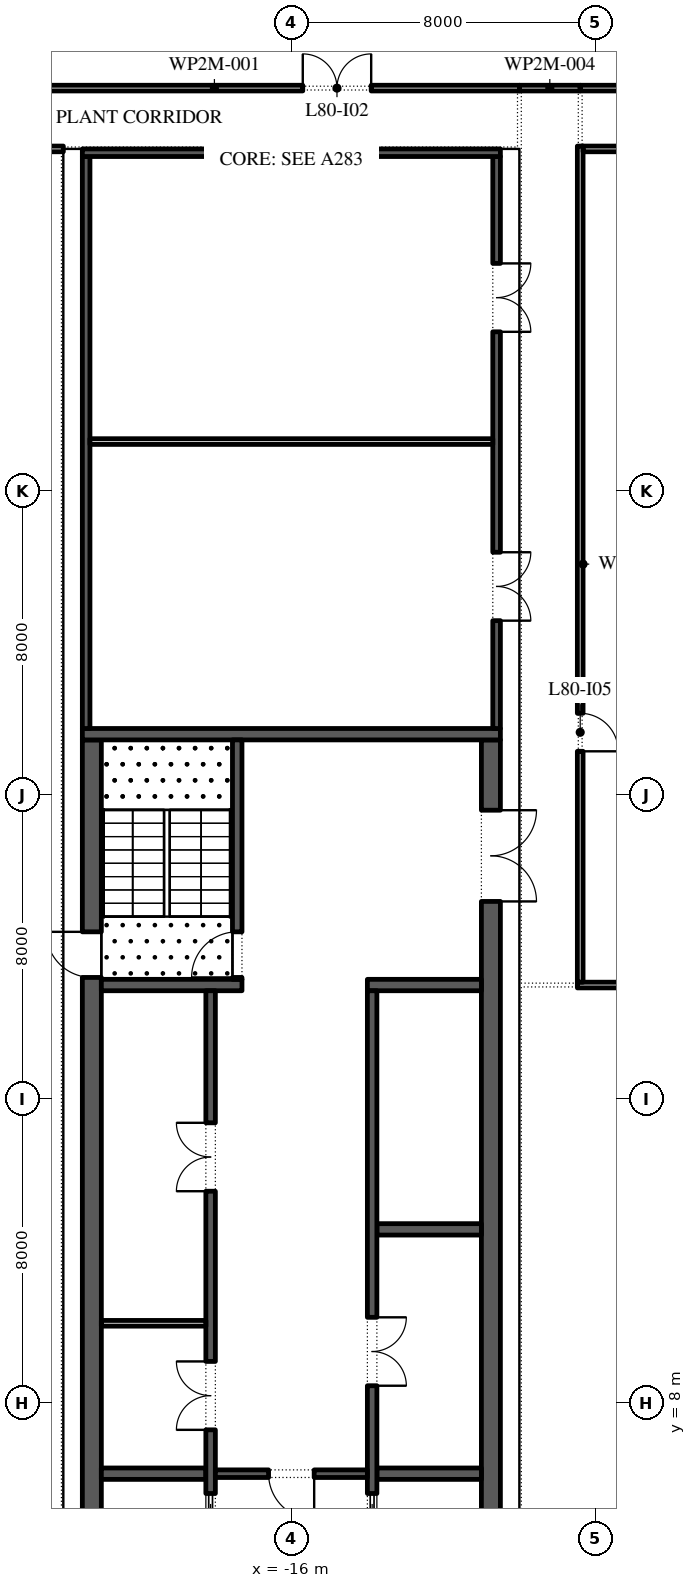
"""IFC4 building model, lengths in metres.
Left out: names, types, materials, properties, quantities, classifications, styles, units other than length and angle.
Written with IfcOpenShell. Run it as: python <this file> out.ifc"""

import sys

from ifc_helpers import new_model, si_unit, direction, frame, frame_2d, origin, place, context, subcontext, project, spatial, rectangle, extrude, element, fill, save


model = new_model("IFC4")
c1 = context("Model", 3, precision=1e-05, world=origin(), true_north=direction((0.0, 1.0)))
c2 = subcontext(c1, "Body", "Model", "MODEL_VIEW")
j1 = project(units=[si_unit("LENGTHUNIT", "METRE"), si_unit("PLANEANGLEUNIT", "RADIAN")], contexts=[c1])
p1 = place(None, origin())
s1 = spatial("IfcSite", under=j1, at=p1, CompositionType="ELEMENT")
p2 = place(p1, origin())
s2 = spatial("IfcBuilding", under=s1, at=p2, CompositionType="ELEMENT")
p3 = place(p2, frame((0.0, 0.0, 363.6)))
s3 = spatial("IfcBuildingStorey", under=s2, at=p3, CompositionType="ELEMENT", Elevation=363.6)
p4 = place(p3, frame((-21.25, -2.45, 0.0), z_axis=(0.0, 0.0, 1.0), x_axis=(0.0, 1.0, 0.0)))
e1 = element("IfcWall", 1, at=p4, inside=s3, PredefinedType="SHEAR", context=c2, shape_type="SweptSolid", body=[
    extrude(rectangle(XDim=27.9, YDim=0.5, at=frame_2d((13.95, 0.0))), origin(), (0.0, 0.0, 1.0), 5.2),
])
p5 = place(p4, frame((5.05, 0.0, 0.0)))
e2 = element("IfcOpeningElement", 2, at=p5, cuts=e1, PredefinedType="OPENING", context=c2, shape_type="SweptSolid", body=[
    extrude(rectangle(XDim=1.2, YDim=2.1, at=frame_2d((0.6, 1.05))), frame((0.0, 0.26, 0.0), z_axis=(0.0, -1.0, 0.0), x_axis=(1.0, 0.0, 0.0)), (0.0, 0.0, 1.0), 0.52),
])
p6 = place(p4, frame((21.65, 0.0, 0.0)))
e3 = element("IfcOpeningElement", 3, at=p6, cuts=e1, PredefinedType="OPENING", context=c2, shape_type="SweptSolid", body=[
    extrude(rectangle(XDim=1.2, YDim=2.1, at=frame_2d((0.6, 1.05))), frame((0.0, 0.26, 0.0), z_axis=(0.0, -1.0, 0.0), x_axis=(1.0, 0.0, 0.0)), (0.0, 0.0, 1.0), 0.52),
])
p7 = place(p3, frame((-10.75, -2.45, 0.0), z_axis=(0.0, 0.0, 1.0), x_axis=(0.0, 1.0, 0.0)))
e4 = element("IfcWall", 4, at=p7, inside=s3, PredefinedType="SHEAR", context=c2, shape_type="SweptSolid", body=[
    extrude(rectangle(XDim=27.9, YDim=0.5, at=frame_2d((13.95, 0.0))), origin(), (0.0, 0.0, 1.0), 5.2),
])
p8 = place(p7, frame((23.65, 0.0, 0.0)))
e5 = element("IfcOpeningElement", 5, at=p8, cuts=e4, PredefinedType="OPENING", context=c2, shape_type="SweptSolid", body=[
    extrude(rectangle(XDim=2.4, YDim=2.1, at=frame_2d((1.2, 1.05))), frame((0.0, 0.26, 0.0), z_axis=(0.0, -1.0, 0.0), x_axis=(1.0, 0.0, 0.0)), (0.0, 0.0, 1.0), 0.52),
])
p9 = place(p7, frame((0.637, 0.0, 0.0)))
e6 = element("IfcOpeningElement", 6, at=p9, cuts=e4, PredefinedType="OPENING", context=c2, shape_type="SweptSolid", body=[
    extrude(rectangle(XDim=1.8, YDim=2.4, at=frame_2d((0.9, 1.2))), frame((0.0, 0.26, 0.0), z_axis=(0.0, -1.0, 0.0), x_axis=(1.0, 0.0, 0.0)), (0.0, 0.0, 1.0), 0.52),
])
p10 = place(p7, frame((3.863, 0.0, 0.0)))
e7 = element("IfcOpeningElement", 7, at=p10, cuts=e4, PredefinedType="OPENING", context=c2, shape_type="SweptSolid", body=[
    extrude(rectangle(XDim=1.8, YDim=2.4, at=frame_2d((0.9, 1.2))), frame((0.0, 0.26, 0.0), z_axis=(0.0, -1.0, 0.0), x_axis=(1.0, 0.0, 0.0)), (0.0, 0.0, 1.0), 0.52),
])
p11 = place(p3, frame((-21.5, 25.6, 0.0), z_axis=(0.0, 0.0, 1.0), x_axis=(1.0, 0.0, 0.0)))
e8 = element("IfcWall", 8, at=p11, inside=s3, PredefinedType="SHEAR", context=c2, shape_type="SweptSolid", body=[
    extrude(rectangle(XDim=11.0, YDim=0.3, at=frame_2d((5.5, 0.0))), origin(), (0.0, 0.0, 1.0), 5.2),
])
p12 = place(p3, frame((-21.0, 19.0, 0.0), z_axis=(0.0, 0.0, 1.0), x_axis=(1.0, 0.0, 0.0)))
e9 = element("IfcWall", 9, at=p12, inside=s3, PredefinedType="SHEAR", context=c2, shape_type="SweptSolid", body=[
    extrude(rectangle(XDim=3.7, YDim=0.3, at=frame_2d((1.85, 0.0))), origin(), (0.0, 0.0, 1.0), 5.2),
])
p13 = place(p3, frame((-17.425, 19.15, 0.0), z_axis=(0.0, 0.0, 1.0), x_axis=(0.0, 1.0, 0.0)))
e10 = element("IfcWall", 10, at=p13, inside=s3, PredefinedType="SHEAR", context=c2, shape_type="SweptSolid", body=[
    extrude(rectangle(XDim=6.3, YDim=0.25, at=frame_2d((3.15, 0.0))), origin(), (0.0, 0.0, 1.0), 5.2),
])
p14 = place(p13, frame((0.05, 0.0, 0.0)))
e11 = element("IfcOpeningElement", 11, at=p14, cuts=e10, PredefinedType="OPENING", context=c2, shape_type="SweptSolid", body=[
    extrude(rectangle(XDim=1.2, YDim=2.1, at=frame_2d((0.6, 1.05))), frame((0.0, 0.135, 0.0), z_axis=(0.0, -1.0, 0.0), x_axis=(1.0, 0.0, 0.0)), (0.0, 0.0, 1.0), 0.27),
])
p15 = place(p3, frame((-21.0, 6.143, 0.0), z_axis=(0.0, 0.0, 1.0), x_axis=(1.0, 0.0, 0.0)))
e12 = element("IfcWall", 12, at=p15, inside=s3, PredefinedType="SHEAR", context=c2, shape_type="SweptSolid", body=[
    extrude(rectangle(XDim=2.75, YDim=0.3, at=frame_2d((1.375, 0.0))), origin(), (0.0, 0.0, 1.0), 5.2),
])
p16 = place(p3, frame((-18.125, 4.15, 0.0), z_axis=(0.0, 0.0, 1.0), x_axis=(0.0, 1.0, 0.0)))
e13 = element("IfcWall", 13, at=p16, inside=s3, PredefinedType="SHEAR", context=c2, shape_type="SweptSolid", body=[
    extrude(rectangle(XDim=14.7, YDim=0.25, at=frame_2d((7.35, 0.0))), origin(), (0.0, 0.0, 1.0), 5.2),
])
p17 = place(p16, frame((3.146, 0.0, 0.0)))
e14 = element("IfcOpeningElement", 14, at=p17, cuts=e13, PredefinedType="OPENING", context=c2, shape_type="SweptSolid", body=[
    extrude(rectangle(XDim=1.8, YDim=2.4, at=frame_2d((0.9, 1.2))), frame((0.0, 0.135, 0.0), z_axis=(0.0, -1.0, 0.0), x_axis=(1.0, 0.0, 0.0)), (0.0, 0.0, 1.0), 0.27),
])
p18 = place(p16, frame((9.425, 0.0, 0.0)))
e15 = element("IfcOpeningElement", 15, at=p18, cuts=e13, PredefinedType="OPENING", context=c2, shape_type="SweptSolid", body=[
    extrude(rectangle(XDim=1.8, YDim=2.4, at=frame_2d((0.9, 1.2))), frame((0.0, 0.135, 0.0), z_axis=(0.0, -1.0, 0.0), x_axis=(1.0, 0.0, 0.0)), (0.0, 0.0, 1.0), 0.27),
])
p19 = place(p16, frame((0.371, 0.0, 0.0)))
e16 = element("IfcOpeningElement", 16, at=p19, cuts=e13, PredefinedType="OPENING", context=c2, shape_type="SweptSolid", body=[
    extrude(rectangle(XDim=1.1, YDim=2.1, at=frame_2d((0.55, 1.05))), frame((0.0, 0.135, 0.0), z_axis=(0.0, -1.0, 0.0), x_axis=(1.0, 0.0, 0.0)), (0.0, 0.0, 1.0), 0.27),
])
p20 = place(p3, frame((-21.0, 10.1, 0.0), z_axis=(0.0, 0.0, 1.0), x_axis=(1.0, 0.0, 0.0)))
e17 = element("IfcWall", 17, at=p20, inside=s3, PredefinedType="PARTITIONING", context=c2, shape_type="SweptSolid", body=[
    extrude(rectangle(XDim=2.75, YDim=0.15, at=frame_2d((1.375, 0.0))), origin(), (0.0, 0.0, 1.0), 5.2),
])
for number, where, z_axis, x_axis in (
    (18, (-13.75, 6.143, 0.0), (0.0, 0.0, 1.0), (1.0, 0.0, 0.0)),
    (19, (-13.75, 12.571, 0.0), (0.0, 0.0, 1.0), (1.0, 0.0, 0.0)),
):
    element("IfcWall", number, at=place(p3, frame(where, z_axis=z_axis, x_axis=x_axis)), inside=s3, PredefinedType="SHEAR", context=c2, shape_type="SweptSolid", body=[
        extrude(rectangle(XDim=2.75, YDim=0.3, at=frame_2d((1.375, 0.0))), origin(), (0.0, 0.0, 1.0), 5.2),
    ])
p21 = place(p3, frame((-14.0, 19.0, 0.0), z_axis=(0.0, 0.0, 1.0), x_axis=(1.0, 0.0, 0.0)))
e20 = element("IfcWall", 20, at=p21, inside=s3, PredefinedType="SHEAR", context=c2, shape_type="SweptSolid", body=[
    extrude(rectangle(XDim=3.0, YDim=0.3, at=frame_2d((1.5, 0.0))), origin(), (0.0, 0.0, 1.0), 5.2),
])
p22 = place(p3, frame((-13.875, -2.45, 0.0), z_axis=(0.0, 0.0, 1.0), x_axis=(0.0, 1.0, 0.0)))
e21 = element("IfcWall", 21, at=p22, inside=s3, PredefinedType="SHEAR", context=c2, shape_type="SweptSolid", body=[
    extrude(rectangle(XDim=21.3, YDim=0.25, at=frame_2d((10.65, 0.0))), origin(), (0.0, 0.0, 1.0), 5.2),
])
p23 = place(p22, frame((10.907, 0.0, 0.0)))
e22 = element("IfcOpeningElement", 22, at=p23, cuts=e21, PredefinedType="OPENING", context=c2, shape_type="SweptSolid", body=[
    extrude(rectangle(XDim=1.8, YDim=2.4, at=frame_2d((0.9, 1.2))), frame((0.0, 0.135, 0.0), z_axis=(0.0, -1.0, 0.0), x_axis=(1.0, 0.0, 0.0)), (0.0, 0.0, 1.0), 0.27),
])
p24 = place(p22, frame((6.971, 0.0, 0.0)))
e23 = element("IfcOpeningElement", 23, at=p24, cuts=e21, PredefinedType="OPENING", context=c2, shape_type="SweptSolid", body=[
    extrude(rectangle(XDim=1.1, YDim=2.1, at=frame_2d((0.55, 1.05))), frame((0.0, 0.135, 0.0), z_axis=(0.0, -1.0, 0.0), x_axis=(1.0, 0.0, 0.0)), (0.0, 0.0, 1.0), 0.27),
])
p25 = place(p3, frame((-18.0, 6.143, 0.0), z_axis=(0.0, 0.0, 1.0), x_axis=(1.0, 0.0, 0.0)))
e24 = element("IfcWall", 24, at=p25, inside=s3, PredefinedType="SHEAR", context=c2, shape_type="SweptSolid", body=[
    extrude(rectangle(XDim=4.0, YDim=0.2, at=frame_2d((2.0, 0.0))), origin(), (0.0, 0.0, 1.0), 5.2),
])
p26 = place(p25, frame((1.4, 0.0, 0.0)))
e25 = element("IfcOpeningElement", 25, at=p26, cuts=e24, PredefinedType="OPENING", context=c2, shape_type="SweptSolid", body=[
    extrude(rectangle(XDim=1.2, YDim=2.1, at=frame_2d((0.6, 1.05))), frame((0.0, 0.11, 0.0), z_axis=(0.0, -1.0, 0.0), x_axis=(1.0, 0.0, 0.0)), (0.0, 0.0, 1.0), 0.22),
])
p27 = place(p3, frame((-21.4, 25.75, 0.0), z_axis=(0.0, 0.0, 1.0), x_axis=(0.0, 1.0, 0.0)))
e26 = element("IfcWall", 26, at=p27, inside=s3, PredefinedType="SHEAR", context=c2, shape_type="SweptSolid", body=[
    extrude(rectangle(XDim=15.05, YDim=0.2, at=frame_2d((7.525, 0.0))), origin(), (0.0, 0.0, 1.0), 5.2),
])
p28 = place(p3, frame((-10.6, 25.75, 0.0), z_axis=(0.0, 0.0, 1.0), x_axis=(0.0, 1.0, 0.0)))
e27 = element("IfcWall", 27, at=p28, inside=s3, PredefinedType="SHEAR", context=c2, shape_type="SweptSolid", body=[
    extrude(rectangle(XDim=15.05, YDim=0.2, at=frame_2d((7.525, 0.0))), origin(), (0.0, 0.0, 1.0), 5.2),
])
p29 = place(p28, frame((2.837, 0.0, 0.0)))
e28 = element("IfcOpeningElement", 28, at=p29, cuts=e27, PredefinedType="OPENING", context=c2, shape_type="SweptSolid", body=[
    extrude(rectangle(XDim=1.8, YDim=2.4, at=frame_2d((0.9, 1.2))), frame((0.0, 0.11, 0.0), z_axis=(0.0, -1.0, 0.0), x_axis=(1.0, 0.0, 0.0)), (0.0, 0.0, 1.0), 0.22),
])
p30 = place(p28, frame((10.438, 0.0, 0.0)))
e29 = element("IfcOpeningElement", 29, at=p30, cuts=e27, PredefinedType="OPENING", context=c2, shape_type="SweptSolid", body=[
    extrude(rectangle(XDim=1.8, YDim=2.4, at=frame_2d((0.9, 1.2))), frame((0.0, 0.11, 0.0), z_axis=(0.0, -1.0, 0.0), x_axis=(1.0, 0.0, 0.0)), (0.0, 0.0, 1.0), 0.22),
])
p31 = place(p3, frame((-21.5, 40.9, 0.0), z_axis=(0.0, 0.0, 1.0), x_axis=(1.0, 0.0, 0.0)))
e30 = element("IfcWall", 30, at=p31, inside=s3, PredefinedType="SHEAR", context=c2, shape_type="SweptSolid", body=[
    extrude(rectangle(XDim=11.0, YDim=0.2, at=frame_2d((5.5, 0.0))), origin(), (0.0, 0.0, 1.0), 5.2),
])
p32 = place(p3, frame((-21.3, 33.3, 0.0), z_axis=(0.0, 0.0, 1.0), x_axis=(1.0, 0.0, 0.0)))
e31 = element("IfcWall", 31, at=p32, inside=s3, PredefinedType="PARTITIONING", context=c2, shape_type="SweptSolid", body=[
    extrude(rectangle(XDim=10.6, YDim=0.15, at=frame_2d((5.3, 0.0))), origin(), (0.0, 0.0, 1.0), 5.2),
])
p33 = place(p3, frame((-26.05, 42.6, 0.0), z_axis=(0.0, 0.0, 1.0), x_axis=(1.0, 0.0, 0.0)))
e32 = element("IfcWall", 32, at=p33, inside=s3, PredefinedType="PARTITIONING", context=c2, shape_type="SweptSolid", body=[
    extrude(rectangle(XDim=16.05, YDim=0.15, at=frame_2d((8.025, 0.0))), origin(), (0.0, 0.0, 1.0), 5.2),
])
p34 = place(p33, frame((10.35, 0.0, 0.0)))
e33 = element("IfcOpeningElement", 33, at=p34, cuts=e32, PredefinedType="OPENING", context=c2, shape_type="SweptSolid", body=[
    extrude(rectangle(XDim=1.8, YDim=2.1, at=frame_2d((0.9, 1.05))), frame((0.0, 0.085, 0.0), z_axis=(0.0, -1.0, 0.0), x_axis=(1.0, 0.0, 0.0)), (0.0, 0.0, 1.0), 0.17),
])
p35 = place(p3, frame((-22.0, 41.0, 0.0), z_axis=(0.0, 0.0, 1.0), x_axis=(-1.0, 0.0, 0.0)))
e34 = element("IfcWall", 34, at=p35, inside=s3, PredefinedType="PARTITIONING", context=c2, shape_type="SweptSolid", body=[
    extrude(rectangle(XDim=4.05, YDim=0.15, at=frame_2d((2.025, 0.0))), origin(), (0.0, 0.0, 1.0), 5.2),
])
p36 = place(p35, frame((2.6, 0.0, 0.0)))
e35 = element("IfcOpeningElement", 35, at=p36, cuts=e34, PredefinedType="OPENING", context=c2, shape_type="SweptSolid", body=[
    extrude(rectangle(XDim=1.0, YDim=2.1, at=frame_2d((0.5, 1.05))), frame((0.0, 0.085, 0.0), z_axis=(0.0, -1.0, 0.0), x_axis=(1.0, 0.0, 0.0)), (0.0, 0.0, 1.0), 0.17),
])
p37 = place(p3, frame((-10.0, 42.6, 0.0), z_axis=(0.0, 0.0, 1.0), x_axis=(1.0, 0.0, 0.0)))
e36 = element("IfcWall", 36, at=p37, inside=s3, PredefinedType="PARTITIONING", context=c2, shape_type="SweptSolid", body=[
    extrude(rectangle(XDim=1.6, YDim=0.15, at=frame_2d((0.8, 0.0))), origin(), (0.0, 0.0, 1.0), 5.2),
])
p38 = place(p3, frame((-8.475, 19.0, 0.0), z_axis=(0.0, 0.0, 1.0), x_axis=(1.0, 0.0, 0.0)))
e37 = element("IfcWall", 37, at=p38, inside=s3, PredefinedType="PARTITIONING", context=c2, shape_type="SweptSolid", body=[
    extrude(rectangle(XDim=6.025, YDim=0.15, at=frame_2d((3.013, 0.0))), origin(), (0.0, 0.0, 1.0), 5.2),
])
p39 = place(p3, frame((-8.4, 41.075, 0.0), z_axis=(0.0, 0.0, 1.0), x_axis=(0.0, -1.0, 0.0)))
e38 = element("IfcWall", 38, at=p39, inside=s3, PredefinedType="PARTITIONING", context=c2, shape_type="SweptSolid", body=[
    extrude(rectangle(XDim=22.0, YDim=0.15, at=frame_2d((11.0, 0.0))), origin(), (0.0, 0.0, 1.0), 5.2),
])
p40 = place(p39, frame((14.925, 0.0, 0.0)))
e39 = element("IfcOpeningElement", 39, at=p40, cuts=e38, PredefinedType="OPENING", context=c2, shape_type="SweptSolid", body=[
    extrude(rectangle(XDim=1.0, YDim=2.1, at=frame_2d((0.5, 1.05))), frame((0.0, 0.085, 0.0), z_axis=(0.0, -1.0, 0.0), x_axis=(1.0, 0.0, 0.0)), (0.0, 0.0, 1.0), 0.17),
])
p41 = place(p3, frame((-8.4, 42.6, 0.0), z_axis=(0.0, 0.0, 1.0), x_axis=(1.0, 0.0, 0.0)))
e40 = element("IfcWall", 40, at=p41, inside=s3, PredefinedType="PARTITIONING", context=c2, shape_type="SweptSolid", body=[
    extrude(rectangle(XDim=8.4, YDim=0.15, at=frame_2d((4.2, 0.0))), origin(), (0.0, 0.0, 1.0), 5.2),
])
p42 = place(p3, frame((-2.55, 41.0, 0.0), z_axis=(0.0, 0.0, 1.0), x_axis=(-1.0, 0.0, 0.0)))
e41 = element("IfcWall", 41, at=p42, inside=s3, PredefinedType="PARTITIONING", context=c2, shape_type="SweptSolid", body=[
    extrude(rectangle(XDim=5.775, YDim=0.15, at=frame_2d((2.887, 0.0))), origin(), (0.0, 0.0, 1.0), 5.2),
])
p43 = place(p17, origin())
e42 = element("IfcDoor", 42, at=p43, inside=s3, OperationType="DOUBLE_DOOR_SINGLE_SWING", PredefinedType="DOOR", context=c2, shape_type="SweptSolid", body=[
    extrude(rectangle(XDim=1.8, YDim=2.4, at=frame_2d((0.9, 1.2))), frame((0.0, 0.125, 0.0), z_axis=(0.0, -1.0, 0.0), x_axis=(1.0, 0.0, 0.0)), (0.0, 0.0, 1.0), 0.05),
])
fill(e14, e42)
p44 = place(p18, origin())
e43 = element("IfcDoor", 43, at=p44, inside=s3, OperationType="DOUBLE_DOOR_SINGLE_SWING", PredefinedType="DOOR", context=c2, shape_type="SweptSolid", body=[
    extrude(rectangle(XDim=1.8, YDim=2.4, at=frame_2d((0.9, 1.2))), frame((0.0, 0.125, 0.0), z_axis=(0.0, -1.0, 0.0), x_axis=(1.0, 0.0, 0.0)), (0.0, 0.0, 1.0), 0.05),
])
fill(e15, e43)
p45 = place(p19, origin())
e44 = element("IfcDoor", 44, at=p45, inside=s3, OperationType="SLIDING_TO_LEFT", PredefinedType="DOOR", context=c2, shape_type="SweptSolid", body=[
    extrude(rectangle(XDim=1.1, YDim=2.1, at=frame_2d((0.55, 1.05))), frame((0.0, 0.025, 0.0), z_axis=(0.0, -1.0, 0.0), x_axis=(1.0, 0.0, 0.0)), (0.0, 0.0, 1.0), 0.05),
])
fill(e16, e44)
p46 = place(p23, frame((1.8, -0.2, 0.0), z_axis=(0.0, 0.0, 1.0), x_axis=(-1.0, 0.0, 0.0)))
e45 = element("IfcDoor", 45, at=p46, inside=s3, OperationType="DOUBLE_DOOR_SINGLE_SWING", PredefinedType="DOOR", context=c2, shape_type="SweptSolid", body=[
    extrude(rectangle(XDim=1.8, YDim=2.4, at=frame_2d((0.9, 1.2))), frame((0.0, -0.075, 0.0), z_axis=(0.0, -1.0, 0.0), x_axis=(1.0, 0.0, 0.0)), (0.0, 0.0, 1.0), 0.05),
])
fill(e22, e45)
p47 = place(p24, origin())
e46 = element("IfcDoor", 46, at=p47, inside=s3, OperationType="SLIDING_TO_LEFT", PredefinedType="DOOR", context=c2, shape_type="SweptSolid", body=[
    extrude(rectangle(XDim=1.1, YDim=2.1, at=frame_2d((0.55, 1.05))), frame((0.0, 0.025, 0.0), z_axis=(0.0, -1.0, 0.0), x_axis=(1.0, 0.0, 0.0)), (0.0, 0.0, 1.0), 0.05),
])
fill(e23, e46)
p48 = place(p26, frame((1.2, 0.0, 0.0), z_axis=(0.0, 0.0, 1.0), x_axis=(-1.0, 0.0, 0.0)))
e47 = element("IfcDoor", 47, at=p48, inside=s3, OperationType="SINGLE_SWING_RIGHT", PredefinedType="DOOR", context=c2, shape_type="SweptSolid", body=[
    extrude(rectangle(XDim=1.2, YDim=2.1, at=frame_2d((0.6, 1.05))), frame((0.0, 0.025, 0.0), z_axis=(0.0, -1.0, 0.0), x_axis=(1.0, 0.0, 0.0)), (0.0, 0.0, 1.0), 0.05),
])
fill(e25, e47)
p49 = place(p8, frame((2.4, 0.0, 0.0), z_axis=(0.0, 0.0, 1.0), x_axis=(-1.0, 0.0, 0.0)))
e48 = element("IfcDoor", 48, at=p49, inside=s3, OperationType="DOUBLE_DOOR_SINGLE_SWING", PredefinedType="DOOR", context=c2, shape_type="SweptSolid", body=[
    extrude(rectangle(XDim=2.4, YDim=2.1, at=frame_2d((1.2, 1.05))), frame((0.0, 0.025, 0.0), z_axis=(0.0, -1.0, 0.0), x_axis=(1.0, 0.0, 0.0)), (0.0, 0.0, 1.0), 0.05),
])
fill(e5, e48)
p50 = place(p14, origin())
e49 = element("IfcDoor", 49, at=p50, inside=s3, OperationType="SINGLE_SWING_RIGHT", PredefinedType="DOOR", context=c2, shape_type="SweptSolid", body=[
    extrude(rectangle(XDim=1.2, YDim=2.1, at=frame_2d((0.6, 1.05))), frame((0.0, 0.025, 0.0), z_axis=(0.0, -1.0, 0.0), x_axis=(1.0, 0.0, 0.0)), (0.0, 0.0, 1.0), 0.05),
])
fill(e11, e49)
p51 = place(p6, origin())
e50 = element("IfcDoor", 50, at=p51, inside=s3, OperationType="SINGLE_SWING_LEFT", PredefinedType="DOOR", context=c2, shape_type="SweptSolid", body=[
    extrude(rectangle(XDim=1.2, YDim=2.1, at=frame_2d((0.6, 1.05))), frame((0.0, 0.025, 0.0), z_axis=(0.0, -1.0, 0.0), x_axis=(1.0, 0.0, 0.0)), (0.0, 0.0, 1.0), 0.05),
])
fill(e3, e50)
p52 = place(p29, frame((1.8, 0.15, 0.0), z_axis=(0.0, 0.0, 1.0), x_axis=(-1.0, 0.0, 0.0)))
e51 = element("IfcDoor", 51, at=p52, inside=s3, OperationType="DOUBLE_DOOR_SINGLE_SWING", PredefinedType="DOOR", context=c2, shape_type="SweptSolid", body=[
    extrude(rectangle(XDim=1.8, YDim=2.4, at=frame_2d((0.9, 1.2))), frame((0.0, 0.1, 0.0), z_axis=(0.0, -1.0, 0.0), x_axis=(1.0, 0.0, 0.0)), (0.0, 0.0, 1.0), 0.05),
])
fill(e28, e51)
p53 = place(p30, frame((1.8, 0.15, 0.0), z_axis=(0.0, 0.0, 1.0), x_axis=(-1.0, 0.0, 0.0)))
e52 = element("IfcDoor", 52, at=p53, inside=s3, OperationType="DOUBLE_DOOR_SINGLE_SWING", PredefinedType="DOOR", context=c2, shape_type="SweptSolid", body=[
    extrude(rectangle(XDim=1.8, YDim=2.4, at=frame_2d((0.9, 1.2))), frame((0.0, 0.1, 0.0), z_axis=(0.0, -1.0, 0.0), x_axis=(1.0, 0.0, 0.0)), (0.0, 0.0, 1.0), 0.05),
])
fill(e29, e52)
p54 = place(p34, origin())
e53 = element("IfcDoor", 53, at=p54, inside=s3, OperationType="SINGLE_SWING_RIGHT", PredefinedType="DOOR", context=c2, shape_type="SweptSolid", body=[
    extrude(rectangle(XDim=1.8, YDim=2.1, at=frame_2d((0.9, 1.05))), frame((0.0, 0.025, 0.0), z_axis=(0.0, -1.0, 0.0), x_axis=(1.0, 0.0, 0.0)), (0.0, 0.0, 1.0), 0.05),
])
fill(e33, e53)
p55 = place(p40, origin())
e54 = element("IfcDoor", 54, at=p55, inside=s3, OperationType="SINGLE_SWING_LEFT", PredefinedType="DOOR", context=c2, shape_type="SweptSolid", body=[
    extrude(rectangle(XDim=1.0, YDim=2.1, at=frame_2d((0.5, 1.05))), frame((0.0, 0.025, 0.0), z_axis=(0.0, -1.0, 0.0), x_axis=(1.0, 0.0, 0.0)), (0.0, 0.0, 1.0), 0.05),
])
fill(e39, e54)
save(model, sys.argv[1])
